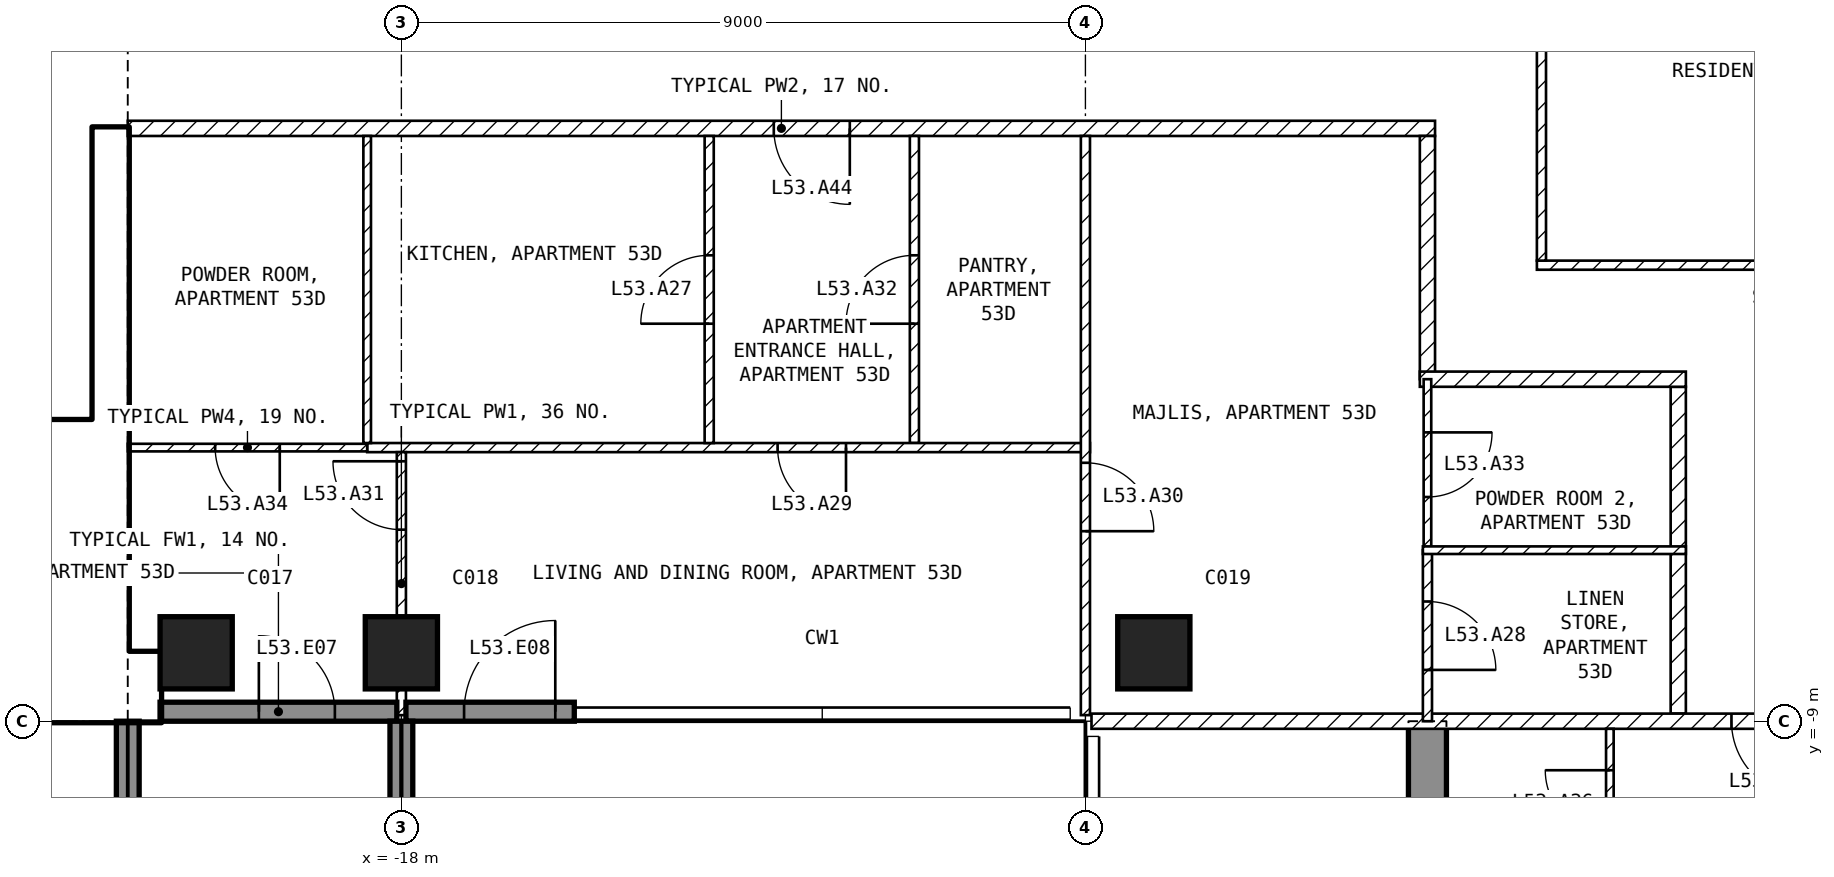
"""IFC4 building model, lengths in metres.
Left out: names, types, materials, properties, quantities, classifications, styles, units other than length and angle.
Written with IfcOpenShell. Run it as: python <this file> out.ifc"""

import sys

from ifc_helpers import new_model, si_unit, direction, frame, frame_2d, origin, origin_2d, place, context, subcontext, project, spatial, polyline, rectangle, outline, extrude, element, fill, save


model = new_model("IFC4")
c1 = context("Model", 3, precision=1e-05, world=origin(), true_north=direction((0.0, 1.0)))
c2 = subcontext(c1, "Body", "Model", "MODEL_VIEW")
j1 = project(units=[si_unit("LENGTHUNIT", "METRE"), si_unit("PLANEANGLEUNIT", "RADIAN")], contexts=[c1])
p1 = place(None, origin())
s1 = spatial("IfcSite", under=j1, at=p1, CompositionType="ELEMENT")
p2 = place(p1, origin())
s2 = spatial("IfcBuilding", under=s1, at=p2, CompositionType="ELEMENT")
p3 = place(p2, frame((0.0, 0.0, 212.1)))
s3 = spatial("IfcBuildingStorey", under=s2, at=p3, CompositionType="ELEMENT", Elevation=212.1)
for number, where, z_axis, x_axis in (
    (1, (-20.7, -8.1, -0.25), (0.0, 0.0, 1.0), (1.0, 0.0, 0.0)),
    (2, (-18.0, -8.1, -0.25), (0.0, 0.0, 1.0), (1.0, 0.0, 0.0)),
    (3, (-8.1, -8.1, -0.25), (0.0, 0.0, 1.0), (1.0, 0.0, 0.0)),
):
    element("IfcColumn", number, at=place(p3, frame(where, z_axis=z_axis, x_axis=x_axis)), inside=s3, PredefinedType="COLUMN", context=c2, shape_type="SweptSolid", body=[
        extrude(rectangle(XDim=0.95, YDim=0.95, at=origin_2d()), origin(), (0.0, 0.0, 1.0), 3.5),
    ])
p4 = place(p3, frame((-4.75, -20.225, -0.25), z_axis=(1.0, 0.0, 0.0), x_axis=(0.0, 1.0, 0.0)))
e4 = element("IfcWall", 4, at=p4, inside=s3, PredefinedType="SHEAR", context=c2, shape_type="SweptSolid", body=[
    extrude(outline(polyline([(0.0, 0.0), (6.725, 0.0), (6.725, 2.65), (9.125, 2.65), (9.125, 0.0), (11.225, 0.0), (11.225, 3.5), (0.0, 3.5), (0.0, 0.0)])), origin(), (0.0, 0.0, 1.0), 0.5),
])
p5 = place(p3, frame((-21.175, -8.875, 0.0), z_axis=(0.0, 0.0, 1.0), x_axis=(1.0, 0.0, 0.0)))
e5 = element("IfcWall", 5, at=p5, inside=s3, PredefinedType="SOLIDWALL", context=c2, shape_type="SweptSolid", body=[
    extrude(rectangle(XDim=3.115, YDim=0.25, at=frame_2d((1.558, 0.0))), origin(), (0.0, 0.0, 1.0), 3.25),
])
p6 = place(p5, frame((1.3, 0.0, 0.0)))
e6 = element("IfcOpeningElement", 6, at=p6, cuts=e5, PredefinedType="OPENING", context=c2, shape_type="SweptSolid", body=[
    extrude(rectangle(XDim=1.0, YDim=2.4, at=frame_2d((0.5, 1.2))), frame((0.0, 0.135, 0.0), z_axis=(0.0, -1.0, 0.0), x_axis=(1.0, 0.0, 0.0)), (0.0, 0.0, 1.0), 0.27),
])
p7 = place(p3, frame((-17.94, -8.875, 0.0), z_axis=(0.0, 0.0, 1.0), x_axis=(1.0, 0.0, 0.0)))
e7 = element("IfcWall", 7, at=p7, inside=s3, PredefinedType="SOLIDWALL", context=c2, shape_type="SweptSolid", body=[
    extrude(rectangle(XDim=2.215, YDim=0.25, at=frame_2d((1.107, 0.0))), origin(), (0.0, 0.0, 1.0), 3.25),
])
p8 = place(p7, frame((0.765, 0.0, 0.0)))
e8 = element("IfcOpeningElement", 8, at=p8, cuts=e7, PredefinedType="OPENING", context=c2, shape_type="SweptSolid", body=[
    extrude(rectangle(XDim=1.2, YDim=2.4, at=frame_2d((0.6, 1.2))), frame((0.0, 0.135, 0.0), z_axis=(0.0, -1.0, 0.0), x_axis=(1.0, 0.0, 0.0)), (0.0, 0.0, 1.0), 0.27),
])
for number, where, z_axis, x_axis in (
    (9, (-21.6, -9.0, 0.0), (0.0, 0.0, 1.0), (0.0, -1.0, 0.0)),
    (10, (-18.0, -9.0, 0.0), (0.0, 0.0, 1.0), (0.0, -1.0, 0.0)),
):
    element("IfcWall", number, at=place(p3, frame(where, z_axis=z_axis, x_axis=x_axis)), inside=s3, PredefinedType="SOLIDWALL", context=c2, shape_type="SweptSolid", body=[
        extrude(rectangle(XDim=2.7, YDim=0.3, at=frame_2d((1.35, 0.0))), origin(), (0.0, 0.0, 1.0), 3.25),
    ])
p9 = place(p3, frame((-30.2, -8.55, 0.0), z_axis=(0.0, 0.0, 1.0), x_axis=(1.0, 0.0, 0.0)))
e11 = element("IfcWall", 11, at=p9, inside=s3, PredefinedType="SHEAR", context=c2, shape_type="SweptSolid", body=[
    extrude(rectangle(XDim=9.025, YDim=0.9, at=frame_2d((4.512, 0.0))), origin(), (0.0, 0.0, 1.0), 3.25),
])
p10 = place(p3, frame((-21.825, -8.1, 0.0), z_axis=(0.0, 0.0, 1.0), x_axis=(0.0, 1.0, 0.0)))
e12 = element("IfcWall", 12, at=p10, inside=s3, PredefinedType="SHEAR", context=c2, shape_type="SweptSolid", body=[
    extrude(rectangle(XDim=6.9, YDim=0.45, at=frame_2d((3.45, 0.0))), origin(), (0.0, 0.0, 1.0), 3.25),
])
p11 = place(p3, frame((-28.35, -5.15, 0.0), z_axis=(0.0, 0.0, 1.0), x_axis=(1.0, 0.0, 0.0)))
e13 = element("IfcWall", 13, at=p11, inside=s3, PredefinedType="SOLIDWALL", context=c2, shape_type="SweptSolid", body=[
    extrude(rectangle(XDim=6.3, YDim=0.2, at=frame_2d((3.15, 0.0))), origin(), (0.0, 0.0, 1.0), 3.25),
])
p12 = place(p11, frame((5.1, 0.0, 0.0)))
e14 = element("IfcOpeningElement", 14, at=p12, cuts=e13, PredefinedType="OPENING", context=c2, shape_type="SweptSolid", body=[
    extrude(rectangle(XDim=1.0, YDim=2.1, at=frame_2d((0.5, 1.05))), frame((0.0, 0.11, 0.0), z_axis=(0.0, -1.0, 0.0), x_axis=(1.0, 0.0, 0.0)), (0.0, 0.0, 1.0), 0.22),
])
p13 = place(p3, frame((-3.06, -3.0, 0.0), z_axis=(0.0, 0.0, 1.0), x_axis=(1.0, 0.0, 0.0)))
e15 = element("IfcWall", 15, at=p13, inside=s3, PredefinedType="PARTITIONING", context=c2, shape_type="SweptSolid", body=[
    extrude(rectangle(XDim=6.12, YDim=0.12, at=frame_2d((3.06, 0.0))), origin(), (0.0, 0.0, 1.0), 3.25),
])
p14 = place(p3, frame((-3.0, 2.94, 0.0), z_axis=(0.0, 0.0, 1.0), x_axis=(0.0, -1.0, 0.0)))
e16 = element("IfcWall", 16, at=p14, inside=s3, PredefinedType="PARTITIONING", context=c2, shape_type="SweptSolid", body=[
    extrude(rectangle(XDim=5.88, YDim=0.12, at=frame_2d((2.94, 0.0))), origin(), (0.0, 0.0, 1.0), 3.25),
])
p15 = place(p3, frame((-4.4, -1.2, 0.0), z_axis=(0.0, 0.0, 1.0), x_axis=(-1.0, 0.0, 0.0)))
e17 = element("IfcWall", 17, at=p15, inside=s3, PredefinedType="PARTITIONING", context=c2, shape_type="SweptSolid", body=[
    extrude(rectangle(XDim=17.2, YDim=0.2, at=frame_2d((8.6, 0.0))), origin(), (0.0, 0.0, 1.0), 3.25),
])
p16 = place(p15, frame((7.7, 0.0, 0.0)))
e18 = element("IfcOpeningElement", 18, at=p16, cuts=e17, PredefinedType="OPENING", context=c2, shape_type="SweptSolid", body=[
    extrude(rectangle(XDim=1.0, YDim=2.1, at=frame_2d((0.5, 1.05))), frame((0.0, 0.11, 0.0), z_axis=(0.0, -1.0, 0.0), x_axis=(1.0, 0.0, 0.0)), (0.0, 0.0, 1.0), 0.22),
])
p17 = place(p3, frame((-4.5, -4.5, 0.0), z_axis=(0.0, 0.0, 1.0), x_axis=(0.0, 1.0, 0.0)))
e19 = element("IfcWall", 19, at=p17, inside=s3, PredefinedType="PARTITIONING", context=c2, shape_type="SweptSolid", body=[
    extrude(rectangle(XDim=3.2, YDim=0.2, at=frame_2d((1.6, 0.0))), origin(), (0.0, 0.0, 1.0), 3.25),
])
p18 = place(p3, frame((-1.2, -8.9, 0.0), z_axis=(0.0, 0.0, 1.0), x_axis=(0.0, 1.0, 0.0)))
e20 = element("IfcWall", 20, at=p18, inside=s3, PredefinedType="PARTITIONING", context=c2, shape_type="SweptSolid", body=[
    extrude(rectangle(XDim=4.3, YDim=0.2, at=frame_2d((2.15, 0.0))), origin(), (0.0, 0.0, 1.0), 3.25),
])
p19 = place(p3, frame((-1.1, -4.5, 0.0), z_axis=(0.0, 0.0, 1.0), x_axis=(-1.0, 0.0, 0.0)))
e21 = element("IfcWall", 21, at=p19, inside=s3, PredefinedType="PARTITIONING", context=c2, shape_type="SweptSolid", body=[
    extrude(rectangle(XDim=3.5, YDim=0.2, at=frame_2d((1.75, 0.0))), origin(), (0.0, 0.0, 1.0), 3.25),
])
p20 = place(p3, frame((8.92, -9.0, 0.0), z_axis=(0.0, 0.0, 1.0), x_axis=(-1.0, 0.0, 0.0)))
e22 = element("IfcWall", 22, at=p20, inside=s3, PredefinedType="PARTITIONING", context=c2, shape_type="SweptSolid", body=[
    extrude(rectangle(XDim=17.84, YDim=0.2, at=frame_2d((8.92, 0.0))), origin(), (0.0, 0.0, 1.0), 3.25),
])
p21 = place(p20, frame((8.42, 0.0, 0.0)))
e23 = element("IfcOpeningElement", 23, at=p21, cuts=e22, PredefinedType="OPENING", context=c2, shape_type="SweptSolid", body=[
    extrude(rectangle(XDim=1.0, YDim=2.1, at=frame_2d((0.5, 1.05))), frame((0.0, 0.11, 0.0), z_axis=(0.0, -1.0, 0.0), x_axis=(1.0, 0.0, 0.0)), (0.0, 0.0, 1.0), 0.22),
])
p22 = place(p3, frame((-11.25, -5.34, 0.0), z_axis=(0.0, 0.0, 1.0), x_axis=(0.0, 1.0, 0.0)))
e24 = element("IfcWall", 24, at=p22, inside=s3, PredefinedType="PARTITIONING", context=c2, shape_type="SweptSolid", body=[
    extrude(rectangle(XDim=4.04, YDim=0.12, at=frame_2d((2.02, 0.0))), origin(), (0.0, 0.0, 1.0), 3.25),
])
p23 = place(p22, frame((1.57, 0.0, 0.0)))
e25 = element("IfcOpeningElement", 25, at=p23, cuts=e24, PredefinedType="OPENING", context=c2, shape_type="SweptSolid", body=[
    extrude(rectangle(XDim=0.9, YDim=2.1, at=frame_2d((0.45, 1.05))), frame((0.0, 0.07, 0.0), z_axis=(0.0, -1.0, 0.0), x_axis=(1.0, 0.0, 0.0)), (0.0, 0.0, 1.0), 0.14),
])
p24 = place(p3, frame((-8.94, -5.4, 0.0), z_axis=(0.0, 0.0, 1.0), x_axis=(-1.0, 0.0, 0.0)))
e26 = element("IfcWall", 26, at=p24, inside=s3, PredefinedType="PARTITIONING", context=c2, shape_type="SweptSolid", body=[
    extrude(rectangle(XDim=9.51, YDim=0.12, at=frame_2d((4.755, 0.0))), origin(), (0.0, 0.0, 1.0), 3.25),
])
p25 = place(p24, frame((3.21, 0.0, 0.0)))
e27 = element("IfcOpeningElement", 27, at=p25, cuts=e26, PredefinedType="OPENING", context=c2, shape_type="SweptSolid", body=[
    extrude(rectangle(XDim=0.9, YDim=2.1, at=frame_2d((0.45, 1.05))), frame((0.0, 0.07, 0.0), z_axis=(0.0, -1.0, 0.0), x_axis=(1.0, 0.0, 0.0)), (0.0, 0.0, 1.0), 0.14),
])
p26 = place(p3, frame((-9.0, -1.3, 0.0), z_axis=(0.0, 0.0, 1.0), x_axis=(0.0, -1.0, 0.0)))
e28 = element("IfcWall", 28, at=p26, inside=s3, PredefinedType="PARTITIONING", context=c2, shape_type="SweptSolid", body=[
    extrude(rectangle(XDim=7.62, YDim=0.12, at=frame_2d((3.81, 0.0))), origin(), (0.0, 0.0, 1.0), 3.25),
])
p27 = place(p26, frame((4.3, 0.0, 0.0)))
e29 = element("IfcOpeningElement", 29, at=p27, cuts=e28, PredefinedType="OPENING", context=c2, shape_type="SweptSolid", body=[
    extrude(rectangle(XDim=0.9, YDim=2.1, at=frame_2d((0.45, 1.05))), frame((0.0, 0.07, 0.0), z_axis=(0.0, -1.0, 0.0), x_axis=(1.0, 0.0, 0.0)), (0.0, 0.0, 1.0), 0.14),
])
p28 = place(p3, frame((-13.95, -5.34, 0.0), z_axis=(0.0, 0.0, 1.0), x_axis=(0.0, 1.0, 0.0)))
e30 = element("IfcWall", 30, at=p28, inside=s3, PredefinedType="PARTITIONING", context=c2, shape_type="SweptSolid", body=[
    extrude(rectangle(XDim=4.04, YDim=0.12, at=frame_2d((2.02, 0.0))), origin(), (0.0, 0.0, 1.0), 3.25),
])
p29 = place(p28, frame((1.57, 0.0, 0.0)))
e31 = element("IfcOpeningElement", 31, at=p29, cuts=e30, PredefinedType="OPENING", context=c2, shape_type="SweptSolid", body=[
    extrude(rectangle(XDim=0.9, YDim=2.1, at=frame_2d((0.45, 1.05))), frame((0.0, 0.07, 0.0), z_axis=(0.0, -1.0, 0.0), x_axis=(1.0, 0.0, 0.0)), (0.0, 0.0, 1.0), 0.14),
])
p30 = place(p3, frame((-18.45, -5.34, 0.0), z_axis=(0.0, 0.0, 1.0), x_axis=(0.0, 1.0, 0.0)))
e32 = element("IfcWall", 32, at=p30, inside=s3, PredefinedType="PARTITIONING", context=c2, shape_type="SweptSolid", body=[
    extrude(rectangle(XDim=4.04, YDim=0.1, at=frame_2d((2.02, 0.0))), origin(), (0.0, 0.0, 1.0), 3.25),
])
p31 = place(p3, frame((-18.45, -5.4, 0.0), z_axis=(0.0, 0.0, 1.0), x_axis=(-1.0, 0.0, 0.0)))
e33 = element("IfcWall", 33, at=p31, inside=s3, PredefinedType="PARTITIONING", context=c2, shape_type="SweptSolid", body=[
    extrude(rectangle(XDim=3.15, YDim=0.1, at=frame_2d((1.575, 0.0))), origin(), (0.0, 0.0, 1.0), 3.25),
])
p32 = place(p31, frame((1.15, 0.0, 0.0)))
e34 = element("IfcOpeningElement", 34, at=p32, cuts=e33, PredefinedType="OPENING", context=c2, shape_type="SweptSolid", body=[
    extrude(rectangle(XDim=0.85, YDim=2.1, at=frame_2d((0.425, 1.05))), frame((0.0, 0.06, 0.0), z_axis=(0.0, -1.0, 0.0), x_axis=(1.0, 0.0, 0.0)), (0.0, 0.0, 1.0), 0.12),
])
p33 = place(p3, frame((-18.0, -8.92, 0.0), z_axis=(0.0, 0.0, 1.0), x_axis=(0.0, 1.0, 0.0)))
e35 = element("IfcWall", 35, at=p33, inside=s3, PredefinedType="PARTITIONING", context=c2, shape_type="SweptSolid", body=[
    extrude(rectangle(XDim=3.46, YDim=0.12, at=frame_2d((1.73, 0.0))), origin(), (0.0, 0.0, 1.0), 2.48),
])
p34 = place(p33, frame((2.44, 0.0, 0.0)))
e36 = element("IfcOpeningElement", 36, at=p34, cuts=e35, PredefinedType="OPENING", context=c2, shape_type="SweptSolid", body=[
    extrude(rectangle(XDim=0.9, YDim=2.1, at=frame_2d((0.45, 1.05))), frame((0.0, 0.07, 0.0), z_axis=(0.0, -1.0, 0.0), x_axis=(1.0, 0.0, 0.0)), (0.0, 0.0, 1.0), 0.14),
])
p35 = place(p3, frame((-4.5, -4.5, 0.0), z_axis=(0.0, 0.0, 1.0), x_axis=(0.0, -1.0, 0.0)))
e37 = element("IfcWall", 37, at=p35, inside=s3, PredefinedType="PARTITIONING", context=c2, shape_type="SweptSolid", body=[
    extrude(rectangle(XDim=2.25, YDim=0.1, at=frame_2d((1.125, 0.0))), origin(), (0.0, 0.0, 1.0), 3.25),
])
p36 = place(p35, frame((0.7, 0.0, 0.0)))
e38 = element("IfcOpeningElement", 38, at=p36, cuts=e37, PredefinedType="OPENING", context=c2, shape_type="SweptSolid", body=[
    extrude(rectangle(XDim=0.85, YDim=2.1, at=frame_2d((0.425, 1.05))), frame((0.0, 0.06, 0.0), z_axis=(0.0, -1.0, 0.0), x_axis=(1.0, 0.0, 0.0)), (0.0, 0.0, 1.0), 0.12),
])
p37 = place(p3, frame((-4.5, -6.75, 0.0), z_axis=(0.0, 0.0, 1.0), x_axis=(0.0, -1.0, 0.0)))
e39 = element("IfcWall", 39, at=p37, inside=s3, PredefinedType="PARTITIONING", context=c2, shape_type="SweptSolid", body=[
    extrude(rectangle(XDim=2.25, YDim=0.12, at=frame_2d((1.125, 0.0))), origin(), (0.0, 0.0, 1.0), 3.25),
])
p38 = place(p37, frame((0.675, 0.0, 0.0)))
e40 = element("IfcOpeningElement", 40, at=p38, cuts=e39, PredefinedType="OPENING", context=c2, shape_type="SweptSolid", body=[
    extrude(rectangle(XDim=0.9, YDim=2.1, at=frame_2d((0.45, 1.05))), frame((0.0, 0.07, 0.0), z_axis=(0.0, -1.0, 0.0), x_axis=(1.0, 0.0, 0.0)), (0.0, 0.0, 1.0), 0.14),
])
p39 = place(p3, frame((-1.1, -6.75, 0.0), z_axis=(0.0, 0.0, 1.0), x_axis=(-1.0, 0.0, 0.0)))
e41 = element("IfcWall", 41, at=p39, inside=s3, PredefinedType="PARTITIONING", context=c2, shape_type="SweptSolid", body=[
    extrude(rectangle(XDim=3.46, YDim=0.1, at=frame_2d((1.73, 0.0))), origin(), (0.0, 0.0, 1.0), 3.25),
])
p40 = place(p3, frame((-2.1, -11.04, 0.0), z_axis=(0.0, 0.0, 1.0), x_axis=(0.0, 1.0, 0.0)))
e42 = element("IfcWall", 42, at=p40, inside=s3, PredefinedType="PARTITIONING", context=c2, shape_type="SweptSolid", body=[
    extrude(rectangle(XDim=1.94, YDim=0.1, at=frame_2d((0.97, 0.0))), origin(), (0.0, 0.0, 1.0), 3.25),
])
p41 = place(p40, frame((0.545, 0.0, 0.0)))
e43 = element("IfcOpeningElement", 43, at=p41, cuts=e42, PredefinedType="OPENING", context=c2, shape_type="SweptSolid", body=[
    extrude(rectangle(XDim=0.85, YDim=2.1, at=frame_2d((0.425, 1.05))), frame((0.0, 0.06, 0.0), z_axis=(0.0, -1.0, 0.0), x_axis=(1.0, 0.0, 0.0)), (0.0, 0.0, 1.0), 0.12),
])
p42 = place(p6, origin())
e44 = element("IfcDoor", 44, at=p42, inside=s3, OperationType="SINGLE_SWING_LEFT", PredefinedType="DOOR", context=c2, shape_type="SweptSolid", body=[
    extrude(rectangle(XDim=1.0, YDim=2.4, at=frame_2d((0.5, 1.2))), frame((0.0, 0.025, 0.0), z_axis=(0.0, -1.0, 0.0), x_axis=(1.0, 0.0, 0.0)), (0.0, 0.0, 1.0), 0.05),
])
fill(e6, e44)
p43 = place(p8, origin())
e45 = element("IfcDoor", 45, at=p43, inside=s3, OperationType="SINGLE_SWING_RIGHT", PredefinedType="DOOR", context=c2, shape_type="SweptSolid", body=[
    extrude(rectangle(XDim=1.2, YDim=2.4, at=frame_2d((0.6, 1.2))), frame((0.0, 0.025, 0.0), z_axis=(0.0, -1.0, 0.0), x_axis=(1.0, 0.0, 0.0)), (0.0, 0.0, 1.0), 0.05),
])
fill(e8, e45)
p44 = place(p12, origin())
e46 = element("IfcDoor", 46, at=p44, inside=s3, OperationType="SINGLE_SWING_LEFT", PredefinedType="DOOR", context=c2, shape_type="SweptSolid", body=[
    extrude(rectangle(XDim=1.0, YDim=2.1, at=frame_2d((0.5, 1.05))), frame((0.0, 0.025, 0.0), z_axis=(0.0, -1.0, 0.0), x_axis=(1.0, 0.0, 0.0)), (0.0, 0.0, 1.0), 0.05),
])
fill(e14, e46)
p45 = place(p29, origin())
e47 = element("IfcDoor", 47, at=p45, inside=s3, OperationType="SINGLE_SWING_LEFT", PredefinedType="DOOR", context=c2, shape_type="SweptSolid", body=[
    extrude(rectangle(XDim=0.9, YDim=2.1, at=frame_2d((0.45, 1.05))), frame((0.0, 0.025, 0.0), z_axis=(0.0, -1.0, 0.0), x_axis=(1.0, 0.0, 0.0)), (0.0, 0.0, 1.0), 0.05),
])
fill(e31, e47)
p46 = place(p38, origin())
e48 = element("IfcDoor", 48, at=p46, inside=s3, OperationType="SINGLE_SWING_RIGHT", PredefinedType="DOOR", context=c2, shape_type="SweptSolid", body=[
    extrude(rectangle(XDim=0.9, YDim=2.1, at=frame_2d((0.45, 1.05))), frame((0.0, 0.025, 0.0), z_axis=(0.0, -1.0, 0.0), x_axis=(1.0, 0.0, 0.0)), (0.0, 0.0, 1.0), 0.05),
])
fill(e40, e48)
p47 = place(p25, origin())
e49 = element("IfcDoor", 49, at=p47, inside=s3, OperationType="SINGLE_SWING_LEFT", PredefinedType="DOOR", context=c2, shape_type="SweptSolid", body=[
    extrude(rectangle(XDim=0.9, YDim=2.1, at=frame_2d((0.45, 1.05))), frame((0.0, 0.025, 0.0), z_axis=(0.0, -1.0, 0.0), x_axis=(1.0, 0.0, 0.0)), (0.0, 0.0, 1.0), 0.05),
])
fill(e27, e49)
p48 = place(p27, origin())
e50 = element("IfcDoor", 50, at=p48, inside=s3, OperationType="SINGLE_SWING_RIGHT", PredefinedType="DOOR", context=c2, shape_type="SweptSolid", body=[
    extrude(rectangle(XDim=0.9, YDim=2.1, at=frame_2d((0.45, 1.05))), frame((0.0, 0.025, 0.0), z_axis=(0.0, -1.0, 0.0), x_axis=(1.0, 0.0, 0.0)), (0.0, 0.0, 1.0), 0.05),
])
fill(e29, e50)
p49 = place(p34, origin())
e51 = element("IfcDoor", 51, at=p49, inside=s3, OperationType="SINGLE_SWING_RIGHT", PredefinedType="DOOR", context=c2, shape_type="SweptSolid", body=[
    extrude(rectangle(XDim=0.9, YDim=2.1, at=frame_2d((0.45, 1.05))), frame((0.0, 0.025, 0.0), z_axis=(0.0, -1.0, 0.0), x_axis=(1.0, 0.0, 0.0)), (0.0, 0.0, 1.0), 0.05),
])
fill(e36, e51)
p50 = place(p23, origin())
e52 = element("IfcDoor", 52, at=p50, inside=s3, OperationType="SINGLE_SWING_LEFT", PredefinedType="DOOR", context=c2, shape_type="SweptSolid", body=[
    extrude(rectangle(XDim=0.9, YDim=2.1, at=frame_2d((0.45, 1.05))), frame((0.0, 0.025, 0.0), z_axis=(0.0, -1.0, 0.0), x_axis=(1.0, 0.0, 0.0)), (0.0, 0.0, 1.0), 0.05),
])
fill(e25, e52)
p51 = place(p36, origin())
e53 = element("IfcDoor", 53, at=p51, inside=s3, OperationType="SINGLE_SWING_LEFT", PredefinedType="DOOR", context=c2, shape_type="SweptSolid", body=[
    extrude(rectangle(XDim=0.85, YDim=2.1, at=frame_2d((0.425, 1.05))), frame((0.0, 0.025, 0.0), z_axis=(0.0, -1.0, 0.0), x_axis=(1.0, 0.0, 0.0)), (0.0, 0.0, 1.0), 0.05),
])
fill(e38, e53)
p52 = place(p32, origin())
e54 = element("IfcDoor", 54, at=p52, inside=s3, OperationType="SINGLE_SWING_LEFT", PredefinedType="DOOR", context=c2, shape_type="SweptSolid", body=[
    extrude(rectangle(XDim=0.85, YDim=2.1, at=frame_2d((0.425, 1.05))), frame((0.0, 0.025, 0.0), z_axis=(0.0, -1.0, 0.0), x_axis=(1.0, 0.0, 0.0)), (0.0, 0.0, 1.0), 0.05),
])
fill(e34, e54)
p53 = place(p21, origin())
e55 = element("IfcDoor", 55, at=p53, inside=s3, OperationType="SINGLE_SWING_LEFT", PredefinedType="DOOR", context=c2, shape_type="SweptSolid", body=[
    extrude(rectangle(XDim=1.0, YDim=2.1, at=frame_2d((0.5, 1.05))), frame((0.0, 0.025, 0.0), z_axis=(0.0, -1.0, 0.0), x_axis=(1.0, 0.0, 0.0)), (0.0, 0.0, 1.0), 0.05),
])
fill(e23, e55)
p54 = place(p41, origin())
e56 = element("IfcDoor", 56, at=p54, inside=s3, OperationType="SINGLE_SWING_RIGHT", PredefinedType="DOOR", context=c2, shape_type="SweptSolid", body=[
    extrude(rectangle(XDim=0.85, YDim=2.1, at=frame_2d((0.425, 1.05))), frame((0.0, 0.025, 0.0), z_axis=(0.0, -1.0, 0.0), x_axis=(1.0, 0.0, 0.0)), (0.0, 0.0, 1.0), 0.05),
])
fill(e43, e56)
p55 = place(p16, origin())
e57 = element("IfcDoor", 57, at=p55, inside=s3, OperationType="SINGLE_SWING_LEFT", PredefinedType="DOOR", context=c2, shape_type="SweptSolid", body=[
    extrude(rectangle(XDim=1.0, YDim=2.1, at=frame_2d((0.5, 1.05))), frame((0.0, 0.025, 0.0), z_axis=(0.0, -1.0, 0.0), x_axis=(1.0, 0.0, 0.0)), (0.0, 0.0, 1.0), 0.05),
])
fill(e18, e57)
save(model, sys.argv[1])
